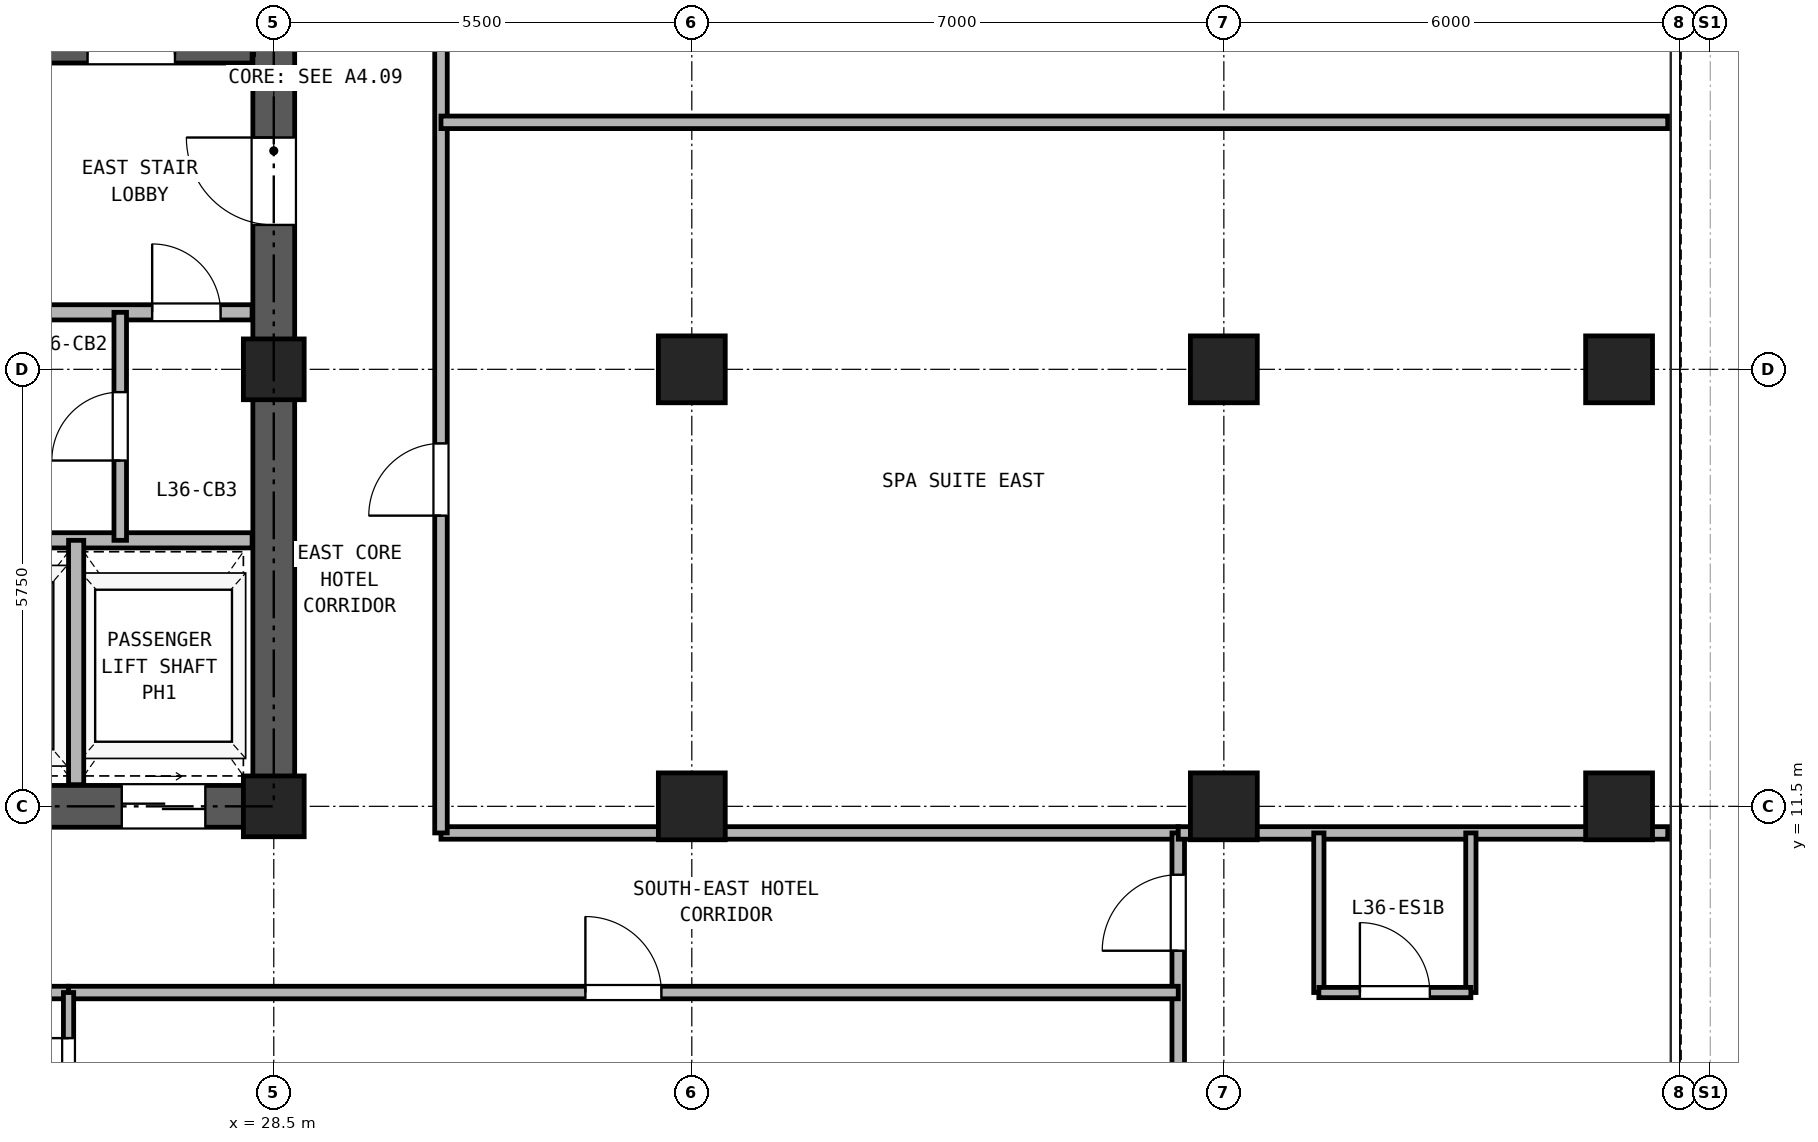
"""IFC4 building model, lengths in metres.
Left out: names, types, materials, properties, quantities, classifications, styles, units other than length and angle.
Written with IfcOpenShell. Run it as: python <this file> out.ifc"""

import sys

from ifc_helpers import new_model, si_unit, direction, frame, frame_2d, origin, origin_2d, place, context, subcontext, project, spatial, rectangle, hollow_rectangle, extrude, source, transform, mapped, element, fill, save


model = new_model("IFC4")
c1 = context("Model", 3, precision=1e-05, world=origin(), true_north=direction((0.0, 1.0)))
c2 = subcontext(c1, "Body", "Model", "MODEL_VIEW")
j1 = project(units=[si_unit("LENGTHUNIT", "METRE"), si_unit("PLANEANGLEUNIT", "RADIAN")], contexts=[c1])
p1 = place(None, origin())
s1 = spatial("IfcSite", under=j1, at=p1, CompositionType="ELEMENT")
p2 = place(p1, origin())
s2 = spatial("IfcBuilding", under=s1, at=p2, CompositionType="ELEMENT")
p3 = place(p2, frame((0.0, 0.0, 131.1)))
s3 = spatial("IfcBuildingStorey", under=s2, at=p3, CompositionType="ELEMENT", Elevation=131.1)
m1 = source(origin(), c2, "Body", "SweptSolid", [
    extrude(hollow_rectangle(XDim=0.88, YDim=0.88, WallThickness=0.05, at=origin_2d()), origin(), (0.0, 0.0, 1.0), 2.95),
])
for number, where, z_axis, x_axis in (
    (1, (46.2, 11.5, 0.0), (0.0, 0.0, 1.0), (1.0, 0.0, 0.0)),
    (2, (46.2, 17.25, 0.0), (0.0, 0.0, 1.0), (1.0, 0.0, 0.0)),
):
    element("IfcColumn", number, at=place(p3, frame(where, z_axis=z_axis, x_axis=x_axis)), inside=s3, PredefinedType="COLUMN", context=c2, shape_type="MappedRepresentation", body=[
        mapped(m1, transform((0.0, 0.0, 0.0), x_axis=(1.0, 0.0, 0.0), y_axis=(0.0, 1.0, 0.0), z_axis=(0.0, 0.0, 1.0), scale=1.0)),
    ])
m2 = source(origin(), c2, "Body", "SweptSolid", [
    extrude(hollow_rectangle(XDim=0.8, YDim=0.8, WallThickness=0.045, at=origin_2d()), origin(), (0.0, 0.0, 1.0), 2.95),
])
for number, where, z_axis, x_axis in (
    (3, (28.5, 11.5, 0.0), (0.0, 0.0, 1.0), (1.0, 0.0, 0.0)),
    (4, (28.5, 17.25, 0.0), (0.0, 0.0, 1.0), (1.0, 0.0, 0.0)),
):
    element("IfcColumn", number, at=place(p3, frame(where, z_axis=z_axis, x_axis=x_axis)), inside=s3, PredefinedType="COLUMN", context=c2, shape_type="MappedRepresentation", body=[
        mapped(m2, transform((0.0, 0.0, 0.0), x_axis=(1.0, 0.0, 0.0), y_axis=(0.0, 1.0, 0.0), z_axis=(0.0, 0.0, 1.0), scale=1.0)),
    ])
for number, where, z_axis, x_axis in (
    (5, (34.0, 11.5, 0.0), (0.0, 0.0, 1.0), (1.0, 0.0, 0.0)),
    (6, (34.0, 17.25, 0.0), (0.0, 0.0, 1.0), (1.0, 0.0, 0.0)),
    (7, (41.0, 11.5, 0.0), (0.0, 0.0, 1.0), (1.0, 0.0, 0.0)),
    (8, (41.0, 17.25, 0.0), (0.0, 0.0, 1.0), (1.0, 0.0, 0.0)),
):
    element("IfcColumn", number, at=place(p3, frame(where, z_axis=z_axis, x_axis=x_axis)), inside=s3, PredefinedType="COLUMN", context=c2, shape_type="MappedRepresentation", body=[
        mapped(m1, transform((0.0, 0.0, 0.0), x_axis=(1.0, 0.0, 0.0), y_axis=(0.0, 1.0, 0.0), z_axis=(0.0, 0.0, 1.0), scale=1.0)),
    ])
p4 = place(p3, frame((18.225, 11.5, 0.0), z_axis=(0.0, 0.0, 1.0), x_axis=(1.0, 0.0, 0.0)))
e9 = element("IfcWall", 9, at=p4, inside=s3, PredefinedType="SHEAR", context=c2, shape_type="SweptSolid", body=[
    extrude(rectangle(XDim=10.55, YDim=0.55, at=frame_2d((5.275, 0.0))), origin(), (0.0, 0.0, 1.0), 2.95),
])
p5 = place(p4, frame((2.375, 0.0, 0.0)))
e10 = element("IfcOpeningElement", 10, at=p5, cuts=e9, PredefinedType="OPENING", context=c2, shape_type="SweptSolid", body=[
    extrude(rectangle(XDim=0.95, YDim=2.15, at=frame_2d((0.475, 1.075))), frame((0.0, 0.285, 0.0), z_axis=(0.0, -1.0, 0.0), x_axis=(1.0, 0.0, 0.0)), (0.0, 0.0, 1.0), 0.57),
])
p6 = place(p4, frame((5.875, 0.0, 0.0)))
e11 = element("IfcOpeningElement", 11, at=p6, cuts=e9, PredefinedType="OPENING", context=c2, shape_type="SweptSolid", body=[
    extrude(rectangle(XDim=1.1, YDim=2.25, at=frame_2d((0.55, 1.125))), frame((0.0, 0.285, 0.0), z_axis=(0.0, -1.0, 0.0), x_axis=(1.0, 0.0, 0.0)), (0.0, 0.0, 1.0), 0.57),
])
p7 = place(p4, frame((8.275, 0.0, 0.0)))
e12 = element("IfcOpeningElement", 12, at=p7, cuts=e9, PredefinedType="OPENING", context=c2, shape_type="SweptSolid", body=[
    extrude(rectangle(XDim=1.1, YDim=2.25, at=frame_2d((0.55, 1.125))), frame((0.0, 0.285, 0.0), z_axis=(0.0, -1.0, 0.0), x_axis=(1.0, 0.0, 0.0)), (0.0, 0.0, 1.0), 0.57),
])
p8 = place(p3, frame((28.5, 11.775, 0.0), z_axis=(0.0, 0.0, 1.0), x_axis=(0.0, 1.0, 0.0)))
e13 = element("IfcWall", 13, at=p8, inside=s3, PredefinedType="SHEAR", context=c2, shape_type="SweptSolid", body=[
    extrude(rectangle(XDim=16.7, YDim=0.55, at=frame_2d((8.35, 0.0))), origin(), (0.0, 0.0, 1.0), 2.95),
])
p9 = place(p8, frame((7.375, 0.0, 0.0)))
e14 = element("IfcOpeningElement", 14, at=p9, cuts=e13, PredefinedType="OPENING", context=c2, shape_type="SweptSolid", body=[
    extrude(rectangle(XDim=1.15, YDim=2.2, at=frame_2d((0.575, 1.1))), frame((0.0, 0.285, 0.0), z_axis=(0.0, -1.0, 0.0), x_axis=(1.0, 0.0, 0.0)), (0.0, 0.0, 1.0), 0.57),
])
p10 = place(p3, frame((28.167, 21.39, 0.0), z_axis=(0.0, 0.0, 1.0), x_axis=(0.0, 1.0, 0.0)))
e15 = element("IfcWall", 15, at=p10, inside=s3, PredefinedType="PARTITIONING", context=c2, shape_type="SweptSolid", body=[
    extrude(rectangle(XDim=6.945, YDim=0.135, at=frame_2d((3.473, 0.0))), origin(), (0.0, 0.0, 1.0), 2.95),
])
p11 = place(p3, frame((25.13, 21.39, 0.0), z_axis=(0.0, 0.0, 1.0), x_axis=(1.0, 0.0, 0.0)))
e16 = element("IfcWall", 16, at=p11, inside=s3, PredefinedType="SOLIDWALL", context=c2, shape_type="SweptSolid", body=[
    extrude(rectangle(XDim=3.085, YDim=0.22, at=frame_2d((1.542, 0.0))), origin(), (0.0, 0.0, 1.0), 2.95),
])
p12 = place(p11, frame((0.92, 0.0, 0.0)))
e17 = element("IfcOpeningElement", 17, at=p12, cuts=e16, PredefinedType="OPENING", context=c2, shape_type="SweptSolid", body=[
    extrude(rectangle(XDim=1.15, YDim=2.2, at=frame_2d((0.575, 1.1))), frame((0.0, 0.12, 0.0), z_axis=(0.0, -1.0, 0.0), x_axis=(1.0, 0.0, 0.0)), (0.0, 0.0, 1.0), 0.24),
])
p13 = place(p3, frame((18.785, 18.0, 0.0), z_axis=(0.0, 0.0, 1.0), x_axis=(1.0, 0.0, 0.0)))
e18 = element("IfcWall", 18, at=p13, inside=s3, PredefinedType="PARTITIONING", context=c2, shape_type="SweptSolid", body=[
    extrude(rectangle(XDim=9.43, YDim=0.2, at=frame_2d((4.715, 0.0))), origin(), (0.0, 0.0, 1.0), 2.95),
])
p14 = place(p13, frame((0.465, 0.0, 0.0)))
e19 = element("IfcOpeningElement", 19, at=p14, cuts=e18, PredefinedType="OPENING", context=c2, shape_type="SweptSolid", body=[
    extrude(rectangle(XDim=1.3, YDim=2.3, at=frame_2d((0.65, 1.15))), frame((0.0, 0.11, 0.0), z_axis=(0.0, -1.0, 0.0), x_axis=(1.0, 0.0, 0.0)), (0.0, 0.0, 1.0), 0.22),
])
p15 = place(p13, frame((2.565, 0.0, 0.0)))
e20 = element("IfcOpeningElement", 20, at=p15, cuts=e18, PredefinedType="OPENING", context=c2, shape_type="SweptSolid", body=[
    extrude(rectangle(XDim=1.3, YDim=2.3, at=frame_2d((0.65, 1.15))), frame((0.0, 0.11, 0.0), z_axis=(0.0, -1.0, 0.0), x_axis=(1.0, 0.0, 0.0)), (0.0, 0.0, 1.0), 0.22),
])
p16 = place(p13, frame((4.985, 0.0, 0.0)))
e21 = element("IfcOpeningElement", 21, at=p16, cuts=e18, PredefinedType="OPENING", context=c2, shape_type="SweptSolid", body=[
    extrude(rectangle(XDim=0.9, YDim=2.05, at=frame_2d((0.45, 1.025))), frame((0.0, 0.11, 0.0), z_axis=(0.0, -1.0, 0.0), x_axis=(1.0, 0.0, 0.0)), (0.0, 0.0, 1.0), 0.22),
])
p17 = place(p13, frame((8.115, 0.0, 0.0)))
e22 = element("IfcOpeningElement", 22, at=p17, cuts=e18, PredefinedType="OPENING", context=c2, shape_type="SweptSolid", body=[
    extrude(rectangle(XDim=0.9, YDim=2.05, at=frame_2d((0.45, 1.025))), frame((0.0, 0.11, 0.0), z_axis=(0.0, -1.0, 0.0), x_axis=(1.0, 0.0, 0.0)), (0.0, 0.0, 1.0), 0.22),
])
p18 = place(p3, frame((18.785, 15.0, 0.0), z_axis=(0.0, 0.0, 1.0), x_axis=(1.0, 0.0, 0.0)))
e23 = element("IfcWall", 23, at=p18, inside=s3, PredefinedType="PARTITIONING", context=c2, shape_type="SweptSolid", body=[
    extrude(rectangle(XDim=9.43, YDim=0.2, at=frame_2d((4.715, 0.0))), origin(), (0.0, 0.0, 1.0), 2.95),
])
p19 = place(p3, frame((26.48, 15.0, 0.0), z_axis=(0.0, 0.0, 1.0), x_axis=(0.0, 1.0, 0.0)))
e24 = element("IfcWall", 24, at=p19, inside=s3, PredefinedType="PARTITIONING", context=c2, shape_type="SweptSolid", body=[
    extrude(rectangle(XDim=3.0, YDim=0.165, at=frame_2d((1.5, 0.0))), origin(), (0.0, 0.0, 1.0), 2.95),
])
p20 = place(p19, frame((1.05, 0.0, 0.0)))
e25 = element("IfcOpeningElement", 25, at=p20, cuts=e24, PredefinedType="OPENING", context=c2, shape_type="SweptSolid", body=[
    extrude(rectangle(XDim=0.9, YDim=2.05, at=frame_2d((0.45, 1.025))), frame((0.0, 0.093, 0.0), z_axis=(0.0, -1.0, 0.0), x_axis=(1.0, 0.0, 0.0)), (0.0, 0.0, 1.0), 0.185),
])
p21 = place(p3, frame((25.9, 11.785, 0.0), z_axis=(0.0, 0.0, 1.0), x_axis=(0.0, 1.0, 0.0)))
e26 = element("IfcWall", 26, at=p21, inside=s3, PredefinedType="PARTITIONING", context=c2, shape_type="SweptSolid", body=[
    extrude(rectangle(XDim=3.215, YDim=0.2, at=frame_2d((1.607, 0.0))), origin(), (0.0, 0.0, 1.0), 2.95),
])
p22 = place(p3, frame((30.7, 11.15, 0.0), z_axis=(0.0, 0.0, 1.0), x_axis=(1.0, 0.0, 0.0)))
e27 = element("IfcWall", 27, at=p22, inside=s3, PredefinedType="PARTITIONING", context=c2, shape_type="SweptSolid", body=[
    extrude(rectangle(XDim=9.7, YDim=0.165, at=frame_2d((4.85, 0.0))), origin(), (0.0, 0.0, 1.0), 2.95),
])
p23 = place(p3, frame((30.7, 11.15, 0.0), z_axis=(0.0, 0.0, 1.0), x_axis=(0.0, 1.0, 0.0)))
e28 = element("IfcWall", 28, at=p23, inside=s3, PredefinedType="PARTITIONING", context=c2, shape_type="SweptSolid", body=[
    extrude(rectangle(XDim=18.7, YDim=0.165, at=frame_2d((9.35, 0.0))), origin(), (0.0, 0.0, 1.0), 2.95),
])
p24 = place(p23, frame((4.175, 0.0, 0.0)))
e29 = element("IfcOpeningElement", 29, at=p24, cuts=e28, PredefinedType="OPENING", context=c2, shape_type="SweptSolid", body=[
    extrude(rectangle(XDim=0.95, YDim=2.15, at=frame_2d((0.475, 1.075))), frame((0.0, 0.093, 0.0), z_axis=(0.0, -1.0, 0.0), x_axis=(1.0, 0.0, 0.0)), (0.0, 0.0, 1.0), 0.185),
])
p25 = place(p23, frame((13.525, 0.0, 0.0)))
e30 = element("IfcOpeningElement", 30, at=p25, cuts=e28, PredefinedType="OPENING", context=c2, shape_type="SweptSolid", body=[
    extrude(rectangle(XDim=0.95, YDim=2.15, at=frame_2d((0.475, 1.075))), frame((0.0, 0.093, 0.0), z_axis=(0.0, -1.0, 0.0), x_axis=(1.0, 0.0, 0.0)), (0.0, 0.0, 1.0), 0.185),
])
p26 = place(p3, frame((40.4, 0.16, 0.0), z_axis=(0.0, 0.0, 1.0), x_axis=(0.0, 1.0, 0.0)))
e31 = element("IfcWall", 31, at=p26, inside=s3, PredefinedType="PARTITIONING", context=c2, shape_type="SweptSolid", body=[
    extrude(rectangle(XDim=10.99, YDim=0.165, at=frame_2d((5.495, 0.0))), origin(), (0.0, 0.0, 1.0), 2.95),
])
p27 = place(p26, frame((9.44, 0.0, 0.0)))
e32 = element("IfcOpeningElement", 32, at=p27, cuts=e31, PredefinedType="OPENING", context=c2, shape_type="SweptSolid", body=[
    extrude(rectangle(XDim=1.0, YDim=2.15, at=frame_2d((0.5, 1.075))), frame((0.0, 0.093, 0.0), z_axis=(0.0, -1.0, 0.0), x_axis=(1.0, 0.0, 0.0)), (0.0, 0.0, 1.0), 0.185),
])
p28 = place(p3, frame((40.4, 11.15, 0.0), z_axis=(0.0, 0.0, 1.0), x_axis=(1.0, 0.0, 0.0)))
e33 = element("IfcWall", 33, at=p28, inside=s3, PredefinedType="PARTITIONING", context=c2, shape_type="SweptSolid", body=[
    extrude(rectangle(XDim=6.44, YDim=0.165, at=frame_2d((3.22, 0.0))), origin(), (0.0, 0.0, 1.0), 2.95),
])
for number, where, z_axis, x_axis in (
    (34, (42.25, 9.05, 0.0), (0.0, 0.0, 1.0), (0.0, 1.0, 0.0)),
    (35, (44.25, 9.05, 0.0), (0.0, 0.0, 1.0), (0.0, 1.0, 0.0)),
):
    element("IfcWall", number, at=place(p3, frame(where, z_axis=z_axis, x_axis=x_axis)), inside=s3, PredefinedType="PARTITIONING", context=c2, shape_type="SweptSolid", body=[
        extrude(rectangle(XDim=2.1, YDim=0.135, at=frame_2d((1.05, 0.0))), origin(), (0.0, 0.0, 1.0), 2.95),
    ])
p29 = place(p3, frame((42.25, 9.05, 0.0), z_axis=(0.0, 0.0, 1.0), x_axis=(1.0, 0.0, 0.0)))
e36 = element("IfcWall", 36, at=p29, inside=s3, PredefinedType="PARTITIONING", context=c2, shape_type="SweptSolid", body=[
    extrude(rectangle(XDim=2.0, YDim=0.135, at=frame_2d((1.0, 0.0))), origin(), (0.0, 0.0, 1.0), 2.95),
])
p30 = place(p29, frame((0.54, 0.0, 0.0)))
e37 = element("IfcOpeningElement", 37, at=p30, cuts=e36, PredefinedType="OPENING", context=c2, shape_type="SweptSolid", body=[
    extrude(rectangle(XDim=0.92, YDim=2.1, at=frame_2d((0.46, 1.05))), frame((0.0, 0.077, 0.0), z_axis=(0.0, -1.0, 0.0), x_axis=(1.0, 0.0, 0.0)), (0.0, 0.0, 1.0), 0.155),
])
p31 = place(p3, frame((23.5, 9.05, 0.0), z_axis=(0.0, 0.0, 1.0), x_axis=(1.0, 0.0, 0.0)))
e38 = element("IfcWall", 38, at=p31, inside=s3, PredefinedType="PARTITIONING", context=c2, shape_type="SweptSolid", body=[
    extrude(rectangle(XDim=2.3, YDim=0.165, at=frame_2d((1.15, 0.0))), origin(), (0.0, 0.0, 1.0), 2.95),
])
p32 = place(p3, frame((25.8, 9.05, 0.0), z_axis=(0.0, 0.0, 1.0), x_axis=(1.0, 0.0, 0.0)))
e39 = element("IfcWall", 39, at=p32, inside=s3, PredefinedType="PARTITIONING", context=c2, shape_type="SweptSolid", body=[
    extrude(rectangle(XDim=14.6, YDim=0.165, at=frame_2d((7.3, 0.0))), origin(), (0.0, 0.0, 1.0), 2.95),
])
p33 = place(p32, frame((6.8, 0.0, 0.0)))
e40 = element("IfcOpeningElement", 40, at=p33, cuts=e39, PredefinedType="OPENING", context=c2, shape_type="SweptSolid", body=[
    extrude(rectangle(XDim=1.0, YDim=2.15, at=frame_2d((0.5, 1.075))), frame((0.0, 0.093, 0.0), z_axis=(0.0, -1.0, 0.0), x_axis=(1.0, 0.0, 0.0)), (0.0, 0.0, 1.0), 0.185),
])
p34 = place(p3, frame((25.8, 6.95, 0.0), z_axis=(0.0, 0.0, 1.0), x_axis=(0.0, 1.0, 0.0)))
e41 = element("IfcWall", 41, at=p34, inside=s3, PredefinedType="PARTITIONING", context=c2, shape_type="SweptSolid", body=[
    extrude(rectangle(XDim=2.1, YDim=0.135, at=frame_2d((1.05, 0.0))), origin(), (0.0, 0.0, 1.0), 2.95),
])
p35 = place(p34, frame((0.58, 0.0, 0.0)))
e42 = element("IfcOpeningElement", 42, at=p35, cuts=e41, PredefinedType="OPENING", context=c2, shape_type="SweptSolid", body=[
    extrude(rectangle(XDim=0.92, YDim=2.1, at=frame_2d((0.46, 1.05))), frame((0.0, 0.077, 0.0), z_axis=(0.0, -1.0, 0.0), x_axis=(1.0, 0.0, 0.0)), (0.0, 0.0, 1.0), 0.155),
])
p36 = place(p3, frame((30.7, 20.5, 0.0), z_axis=(0.0, 0.0, 1.0), x_axis=(1.0, 0.0, 0.0)))
e43 = element("IfcWall", 43, at=p36, inside=s3, PredefinedType="PARTITIONING", context=c2, shape_type="SweptSolid", body=[
    extrude(rectangle(XDim=16.14, YDim=0.165, at=frame_2d((8.07, 0.0))), origin(), (0.0, 0.0, 1.0), 2.95),
])
p37 = place(p12, frame((1.15, 0.0, 0.0), z_axis=(0.0, 0.0, 1.0), x_axis=(-1.0, 0.0, 0.0)))
e44 = element("IfcDoor", 44, at=p37, inside=s3, OperationType="SINGLE_SWING_RIGHT", PredefinedType="DOOR", context=c2, shape_type="SweptSolid", body=[
    extrude(rectangle(XDim=1.15, YDim=2.2, at=frame_2d((0.575, 1.1))), frame((0.0, 0.025, 0.0), z_axis=(0.0, -1.0, 0.0), x_axis=(1.0, 0.0, 0.0)), (0.0, 0.0, 1.0), 0.05),
])
fill(e17, e44)
p38 = place(p20, origin())
e45 = element("IfcDoor", 45, at=p38, inside=s3, OperationType="SINGLE_SWING_LEFT", PredefinedType="DOOR", context=c2, shape_type="SweptSolid", body=[
    extrude(rectangle(XDim=0.9, YDim=2.05, at=frame_2d((0.45, 1.025))), frame((0.0, 0.025, 0.0), z_axis=(0.0, -1.0, 0.0), x_axis=(1.0, 0.0, 0.0)), (0.0, 0.0, 1.0), 0.05),
])
fill(e25, e45)
p39 = place(p17, frame((0.9, 0.0, 0.0), z_axis=(0.0, 0.0, 1.0), x_axis=(-1.0, 0.0, 0.0)))
e46 = element("IfcDoor", 46, at=p39, inside=s3, OperationType="SINGLE_SWING_LEFT", PredefinedType="DOOR", context=c2, shape_type="SweptSolid", body=[
    extrude(rectangle(XDim=0.9, YDim=2.05, at=frame_2d((0.45, 1.025))), frame((0.0, 0.025, 0.0), z_axis=(0.0, -1.0, 0.0), x_axis=(1.0, 0.0, 0.0)), (0.0, 0.0, 1.0), 0.05),
])
fill(e22, e46)
p40 = place(p9, origin())
e47 = element("IfcDoor", 47, at=p40, inside=s3, OperationType="SINGLE_SWING_RIGHT", PredefinedType="DOOR", context=c2, shape_type="SweptSolid", body=[
    extrude(rectangle(XDim=1.15, YDim=2.2, at=frame_2d((0.575, 1.1))), frame((0.0, 0.025, 0.0), z_axis=(0.0, -1.0, 0.0), x_axis=(1.0, 0.0, 0.0)), (0.0, 0.0, 1.0), 0.05),
])
fill(e14, e47)
p41 = place(p7, frame((1.1, 0.0, 0.0), z_axis=(0.0, 0.0, 1.0), x_axis=(-1.0, 0.0, 0.0)))
e48 = element("IfcDoor", 48, at=p41, inside=s3, OperationType="DOUBLE_DOOR_SLIDING", PredefinedType="DOOR", context=c2, shape_type="SweptSolid", body=[
    extrude(rectangle(XDim=1.1, YDim=2.25, at=frame_2d((0.55, 1.125))), frame((0.0, 0.025, 0.0), z_axis=(0.0, -1.0, 0.0), x_axis=(1.0, 0.0, 0.0)), (0.0, 0.0, 1.0), 0.05),
])
fill(e12, e48)
p42 = place(p30, origin())
e49 = element("IfcDoor", 49, at=p42, inside=s3, OperationType="SINGLE_SWING_LEFT", PredefinedType="DOOR", context=c2, shape_type="SweptSolid", body=[
    extrude(rectangle(XDim=0.92, YDim=2.1, at=frame_2d((0.46, 1.05))), frame((0.0, 0.025, 0.0), z_axis=(0.0, -1.0, 0.0), x_axis=(1.0, 0.0, 0.0)), (0.0, 0.0, 1.0), 0.05),
])
fill(e37, e49)
p43 = place(p27, frame((1.0, 0.0, 0.0), z_axis=(0.0, 0.0, 1.0), x_axis=(-1.0, 0.0, 0.0)))
e50 = element("IfcDoor", 50, at=p43, inside=s3, OperationType="SINGLE_SWING_LEFT", PredefinedType="DOOR", context=c2, shape_type="SweptSolid", body=[
    extrude(rectangle(XDim=1.0, YDim=2.15, at=frame_2d((0.5, 1.075))), frame((0.0, 0.025, 0.0), z_axis=(0.0, -1.0, 0.0), x_axis=(1.0, 0.0, 0.0)), (0.0, 0.0, 1.0), 0.05),
])
fill(e32, e50)
p44 = place(p35, frame((0.92, 0.0, 0.0), z_axis=(0.0, 0.0, 1.0), x_axis=(-1.0, 0.0, 0.0)))
e51 = element("IfcDoor", 51, at=p44, inside=s3, OperationType="SINGLE_SWING_RIGHT", PredefinedType="DOOR", context=c2, shape_type="SweptSolid", body=[
    extrude(rectangle(XDim=0.92, YDim=2.1, at=frame_2d((0.46, 1.05))), frame((0.0, 0.025, 0.0), z_axis=(0.0, -1.0, 0.0), x_axis=(1.0, 0.0, 0.0)), (0.0, 0.0, 1.0), 0.05),
])
fill(e42, e51)
p45 = place(p33, frame((1.0, 0.0, 0.0), z_axis=(0.0, 0.0, 1.0), x_axis=(-1.0, 0.0, 0.0)))
e52 = element("IfcDoor", 52, at=p45, inside=s3, OperationType="SINGLE_SWING_LEFT", PredefinedType="DOOR", context=c2, shape_type="SweptSolid", body=[
    extrude(rectangle(XDim=1.0, YDim=2.15, at=frame_2d((0.5, 1.075))), frame((0.0, 0.025, 0.0), z_axis=(0.0, -1.0, 0.0), x_axis=(1.0, 0.0, 0.0)), (0.0, 0.0, 1.0), 0.05),
])
fill(e40, e52)
p46 = place(p24, origin())
e53 = element("IfcDoor", 53, at=p46, inside=s3, OperationType="SINGLE_SWING_LEFT", PredefinedType="DOOR", context=c2, shape_type="SweptSolid", body=[
    extrude(rectangle(XDim=0.95, YDim=2.15, at=frame_2d((0.475, 1.075))), frame((0.0, 0.025, 0.0), z_axis=(0.0, -1.0, 0.0), x_axis=(1.0, 0.0, 0.0)), (0.0, 0.0, 1.0), 0.05),
])
fill(e29, e53)
save(model, sys.argv[1])
